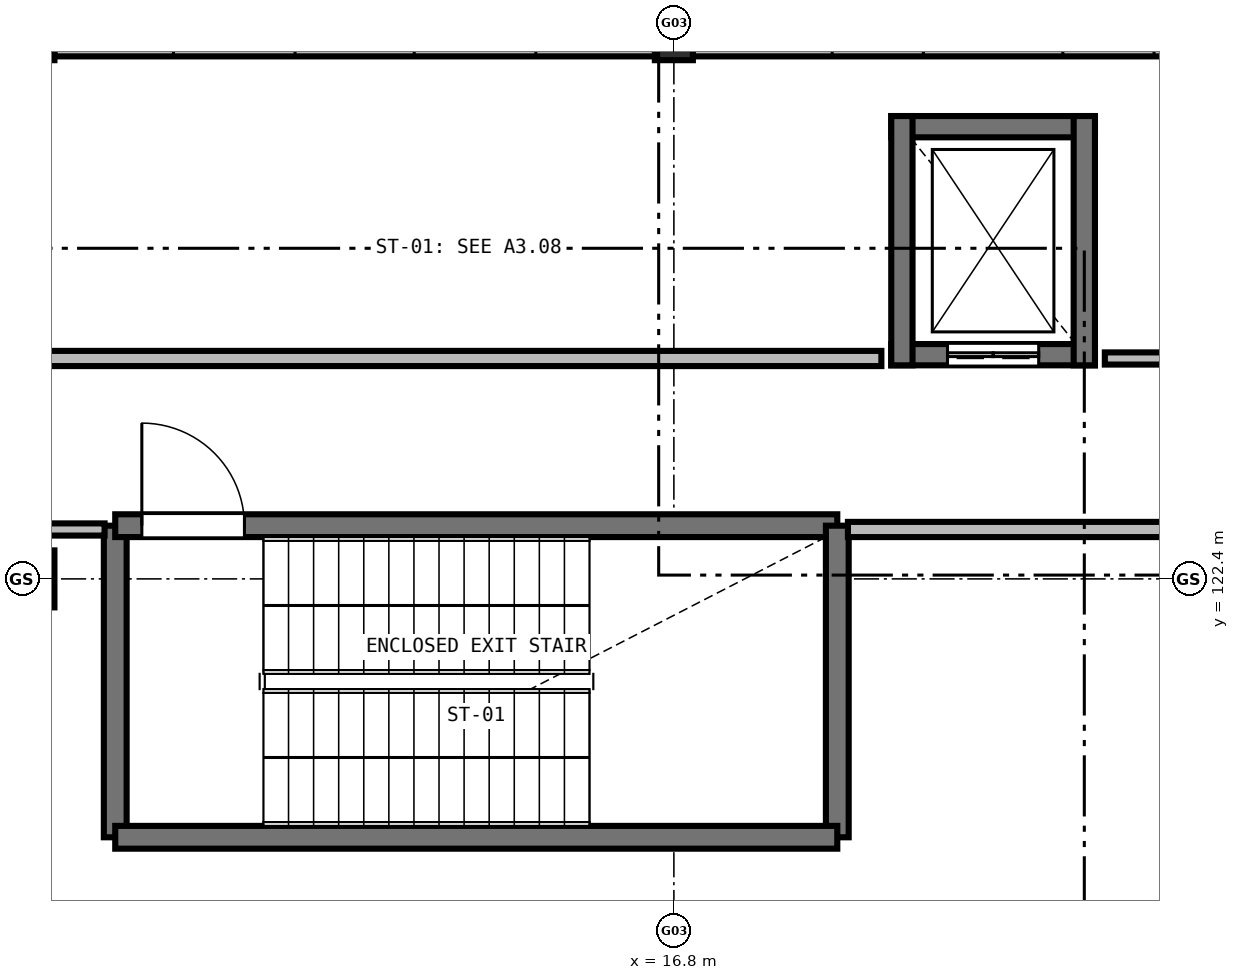
"""IFC4 building model, lengths in metres.
Left out: names, types, materials, properties, quantities, classifications, styles, units other than length and angle.
Written with IfcOpenShell. Run it as: python <this file> out.ifc"""

import sys

from ifc_helpers import new_model, si_unit, direction, frame, frame_2d, origin, origin_2d, place, context, subcontext, project, spatial, rectangle, extrude, element, fill, save


model = new_model("IFC4")
c1 = context("Model", 3, precision=1e-05, world=origin(), true_north=direction((0.0, 1.0)))
c2 = subcontext(c1, "Body", "Model", "MODEL_VIEW")
j1 = project(units=[si_unit("LENGTHUNIT", "METRE"), si_unit("PLANEANGLEUNIT", "RADIAN")], contexts=[c1])
p1 = place(None, origin())
s1 = spatial("IfcSite", under=j1, at=p1, CompositionType="ELEMENT")
p2 = place(p1, origin())
s2 = spatial("IfcBuilding", under=s1, at=p2, CompositionType="ELEMENT")
p3 = place(p2, frame((0.0, 0.0, 17.7)))
s3 = spatial("IfcBuildingStorey", under=s2, at=p3, CompositionType="ELEMENT", Elevation=17.7)
for number, where, z_axis, x_axis in (
    (1, (8.4, 122.4, 0.0), (0.0, 0.0, 1.0), (1.0, 0.0, 0.0)),
    (2, (8.4, 129.6, 0.0), (0.0, 0.0, 1.0), (1.0, 0.0, 0.0)),
    (3, (16.8, 129.6, 0.0), (0.0, 0.0, 1.0), (1.0, 0.0, 0.0)),
):
    element("IfcColumn", number, at=place(p3, frame(where, z_axis=z_axis, x_axis=x_axis)), inside=s3, PredefinedType="COLUMN", context=c2, shape_type="SweptSolid", body=[
        extrude(rectangle(XDim=0.5, YDim=0.75, at=origin_2d()), origin(), (0.0, 0.0, 1.0), 4.2),
    ])
p4 = place(p3, frame((8.648, 129.43, 0.0), z_axis=(0.0, 0.0, 1.0), x_axis=(1.0, 0.0, 0.0)))
e4 = element("IfcWall", 4, at=p4, inside=s3, PredefinedType="SOLIDWALL", context=c2, shape_type="SweptSolid", body=[
    extrude(rectangle(XDim=7.904, YDim=0.31, at=frame_2d((3.952, 0.0))), origin(), (0.0, 0.0, 1.0), 3.25),
])
p5 = place(p4, frame((1.568, 0.0, 0.95)))
e5 = element("IfcOpeningElement", 5, at=p5, cuts=e4, PredefinedType="OPENING", context=c2, shape_type="SweptSolid", body=[
    extrude(rectangle(XDim=1.6, YDim=1.9, at=frame_2d((0.8, 0.95))), frame((0.0, 0.165, 0.0), z_axis=(0.0, -1.0, 0.0), x_axis=(1.0, 0.0, 0.0)), (0.0, 0.0, 1.0), 0.33),
])
p6 = place(p4, frame((4.736, 0.0, 0.95)))
e6 = element("IfcOpeningElement", 6, at=p6, cuts=e4, PredefinedType="OPENING", context=c2, shape_type="SweptSolid", body=[
    extrude(rectangle(XDim=1.6, YDim=1.9, at=frame_2d((0.8, 0.95))), frame((0.0, 0.165, 0.0), z_axis=(0.0, -1.0, 0.0), x_axis=(1.0, 0.0, 0.0)), (0.0, 0.0, 1.0), 0.33),
])
p7 = place(p3, frame((17.048, 129.43, 0.0), z_axis=(0.0, 0.0, 1.0), x_axis=(1.0, 0.0, 0.0)))
e7 = element("IfcWall", 7, at=p7, inside=s3, PredefinedType="SOLIDWALL", context=c2, shape_type="SweptSolid", body=[
    extrude(rectangle(XDim=7.904, YDim=0.31, at=frame_2d((3.952, 0.0))), origin(), (0.0, 0.0, 1.0), 3.25),
])
p8 = place(p7, frame((1.835, 0.0, 0.95)))
e8 = element("IfcOpeningElement", 8, at=p8, cuts=e7, PredefinedType="OPENING", context=c2, shape_type="SweptSolid", body=[
    extrude(rectangle(XDim=1.2, YDim=1.8, at=frame_2d((0.6, 0.9))), frame((0.0, 0.165, 0.0), z_axis=(0.0, -1.0, 0.0), x_axis=(1.0, 0.0, 0.0)), (0.0, 0.0, 1.0), 0.33),
])
p9 = place(p7, frame((4.869, 0.0, 0.95)))
e9 = element("IfcOpeningElement", 9, at=p9, cuts=e7, PredefinedType="OPENING", context=c2, shape_type="SweptSolid", body=[
    extrude(rectangle(XDim=1.2, YDim=1.8, at=frame_2d((0.6, 0.9))), frame((0.0, 0.165, 0.0), z_axis=(0.0, -1.0, 0.0), x_axis=(1.0, 0.0, 0.0)), (0.0, 0.0, 1.0), 0.33),
])
p10 = place(p3, frame((9.45, 119.0, 0.0), z_axis=(0.0, 0.0, 1.0), x_axis=(0.0, 1.0, 0.0)))
e10 = element("IfcWall", 10, at=p10, inside=s3, PredefinedType="SHEAR", context=c2, shape_type="SweptSolid", body=[
    extrude(rectangle(XDim=4.1, YDim=0.3, at=frame_2d((2.05, 0.0))), origin(), (0.0, 0.0, 1.0), 3.88),
])
p11 = place(p3, frame((9.45, 123.1, 0.0), z_axis=(0.0, 0.0, 1.0), x_axis=(1.0, 0.0, 0.0)))
e11 = element("IfcWall", 11, at=p11, inside=s3, PredefinedType="SHEAR", context=c2, shape_type="SweptSolid", body=[
    extrude(rectangle(XDim=9.5, YDim=0.3, at=frame_2d((4.75, 0.0))), origin(), (0.0, 0.0, 1.0), 3.88),
])
p12 = place(p11, frame((0.35, 0.0, 0.0)))
e12 = element("IfcOpeningElement", 12, at=p12, cuts=e11, PredefinedType="OPENING", context=c2, shape_type="SweptSolid", body=[
    extrude(rectangle(XDim=1.35, YDim=2.2, at=frame_2d((0.675, 1.1))), frame((0.0, 0.16, 0.0), z_axis=(0.0, -1.0, 0.0), x_axis=(1.0, 0.0, 0.0)), (0.0, 0.0, 1.0), 0.32),
])
p13 = place(p3, frame((18.95, 123.1, 0.0), z_axis=(0.0, 0.0, 1.0), x_axis=(0.0, -1.0, 0.0)))
e13 = element("IfcWall", 13, at=p13, inside=s3, PredefinedType="SHEAR", context=c2, shape_type="SweptSolid", body=[
    extrude(rectangle(XDim=4.1, YDim=0.3, at=frame_2d((2.05, 0.0))), origin(), (0.0, 0.0, 1.0), 3.88),
])
p14 = place(p3, frame((18.95, 119.0, 0.0), z_axis=(0.0, 0.0, 1.0), x_axis=(-1.0, 0.0, 0.0)))
e14 = element("IfcWall", 14, at=p14, inside=s3, PredefinedType="SHEAR", context=c2, shape_type="SweptSolid", body=[
    extrude(rectangle(XDim=9.5, YDim=0.3, at=frame_2d((4.75, 0.0))), origin(), (0.0, 0.0, 1.0), 3.88),
])
p15 = place(p3, frame((22.34, 125.35, 0.0), z_axis=(0.0, 0.0, 1.0), x_axis=(-1.0, 0.0, 0.0)))
e15 = element("IfcWall", 15, at=p15, inside=s3, PredefinedType="SHEAR", context=c2, shape_type="SweptSolid", body=[
    extrude(rectangle(XDim=2.68, YDim=0.28, at=frame_2d((1.34, 0.0))), origin(), (0.0, 0.0, 1.0), 3.88),
])
p16 = place(p15, frame((0.74, 0.0, 0.0)))
e16 = element("IfcOpeningElement", 16, at=p16, cuts=e15, PredefinedType="OPENING", context=c2, shape_type="SweptSolid", body=[
    extrude(rectangle(XDim=1.2, YDim=2.15, at=frame_2d((0.6, 1.075))), frame((0.0, 0.15, 0.0), z_axis=(0.0, -1.0, 0.0), x_axis=(1.0, 0.0, 0.0)), (0.0, 0.0, 1.0), 0.3),
])
p17 = place(p3, frame((19.66, 128.35, 0.0), z_axis=(0.0, 0.0, 1.0), x_axis=(1.0, 0.0, 0.0)))
e17 = element("IfcWall", 17, at=p17, inside=s3, PredefinedType="SHEAR", context=c2, shape_type="SweptSolid", body=[
    extrude(rectangle(XDim=2.68, YDim=0.28, at=frame_2d((1.34, 0.0))), origin(), (0.0, 0.0, 1.0), 3.88),
])
for number, where, z_axis, x_axis in (
    (18, (19.8, 125.21, 0.0), (0.0, 0.0, 1.0), (0.0, 1.0, 0.0)),
    (19, (22.2, 128.49, 0.0), (0.0, 0.0, 1.0), (0.0, -1.0, 0.0)),
):
    element("IfcWall", number, at=place(p3, frame(where, z_axis=z_axis, x_axis=x_axis)), inside=s3, PredefinedType="SHEAR", context=c2, shape_type="SweptSolid", body=[
        extrude(rectangle(XDim=3.28, YDim=0.28, at=frame_2d((1.64, 0.0))), origin(), (0.0, 0.0, 1.0), 3.88),
    ])
p18 = place(p3, frame((0.22, 125.3, 0.0), z_axis=(0.0, 0.0, 1.0), x_axis=(1.0, 0.0, 0.0)))
e20 = element("IfcWall", 20, at=p18, inside=s3, PredefinedType="SOLIDWALL", context=c2, shape_type="SweptSolid", body=[
    extrude(rectangle(XDim=19.31, YDim=0.2, at=frame_2d((9.655, 0.0))), origin(), (0.0, 0.0, 1.0), 3.355),
])
p19 = place(p18, frame((3.205, 0.0, 0.0)))
e21 = element("IfcOpeningElement", 21, at=p19, cuts=e20, PredefinedType="OPENING", context=c2, shape_type="SweptSolid", body=[
    extrude(rectangle(XDim=1.55, YDim=2.2, at=frame_2d((0.775, 1.1))), frame((0.0, 0.11, 0.0), z_axis=(0.0, -1.0, 0.0), x_axis=(1.0, 0.0, 0.0)), (0.0, 0.0, 1.0), 0.22),
])
p20 = place(p3, frame((22.47, 125.3, 0.0), z_axis=(0.0, 0.0, 1.0), x_axis=(1.0, 0.0, 0.0)))
e22 = element("IfcWall", 22, at=p20, inside=s3, PredefinedType="PARTITIONING", context=c2, shape_type="SweptSolid", body=[
    extrude(rectangle(XDim=19.53, YDim=0.16, at=frame_2d((9.765, 0.0))), origin(), (0.0, 0.0, 1.0), 3.355),
])
p21 = place(p3, frame((25.2, 123.05, 0.0), z_axis=(0.0, 0.0, 1.0), x_axis=(-1.0, 0.0, 0.0)))
e23 = element("IfcWall", 23, at=p21, inside=s3, PredefinedType="SOLIDWALL", context=c2, shape_type="SweptSolid", body=[
    extrude(rectangle(XDim=6.11, YDim=0.2, at=frame_2d((3.055, 0.0))), origin(), (0.0, 0.0, 1.0), 3.355),
])
p22 = place(p3, frame((9.31, 123.05, 0.0), z_axis=(0.0, 0.0, 1.0), x_axis=(-1.0, 0.0, 0.0)))
e24 = element("IfcWall", 24, at=p22, inside=s3, PredefinedType="PARTITIONING", context=c2, shape_type="SweptSolid", body=[
    extrude(rectangle(XDim=9.09, YDim=0.16, at=frame_2d((4.545, 0.0))), origin(), (0.0, 0.0, 1.0), 3.355),
])
p23 = place(p22, frame((4.46, 0.0, 0.0)))
e25 = element("IfcOpeningElement", 25, at=p23, cuts=e24, PredefinedType="OPENING", context=c2, shape_type="SweptSolid", body=[
    extrude(rectangle(XDim=1.3, YDim=2.15, at=frame_2d((0.65, 1.075))), frame((0.0, 0.09, 0.0), z_axis=(0.0, -1.0, 0.0), x_axis=(1.0, 0.0, 0.0)), (0.0, 0.0, 1.0), 0.18),
])
p24 = place(p12, origin())
e26 = element("IfcDoor", 26, at=p24, inside=s3, OperationType="SINGLE_SWING_LEFT", PredefinedType="DOOR", context=c2, shape_type="SweptSolid", body=[
    extrude(rectangle(XDim=1.35, YDim=2.2, at=frame_2d((0.675, 1.1))), frame((0.0, 0.025, 0.0), z_axis=(0.0, -1.0, 0.0), x_axis=(1.0, 0.0, 0.0)), (0.0, 0.0, 1.0), 0.05),
])
fill(e12, e26)
p25 = place(p16, origin())
e27 = element("IfcDoor", 27, at=p25, inside=s3, OperationType="DOUBLE_DOOR_SLIDING", PredefinedType="DOOR", context=c2, shape_type="SweptSolid", body=[
    extrude(rectangle(XDim=1.2, YDim=2.15, at=frame_2d((0.6, 1.075))), frame((0.0, 0.025, 0.0), z_axis=(0.0, -1.0, 0.0), x_axis=(1.0, 0.0, 0.0)), (0.0, 0.0, 1.0), 0.05),
])
fill(e16, e27)
save(model, sys.argv[1])
